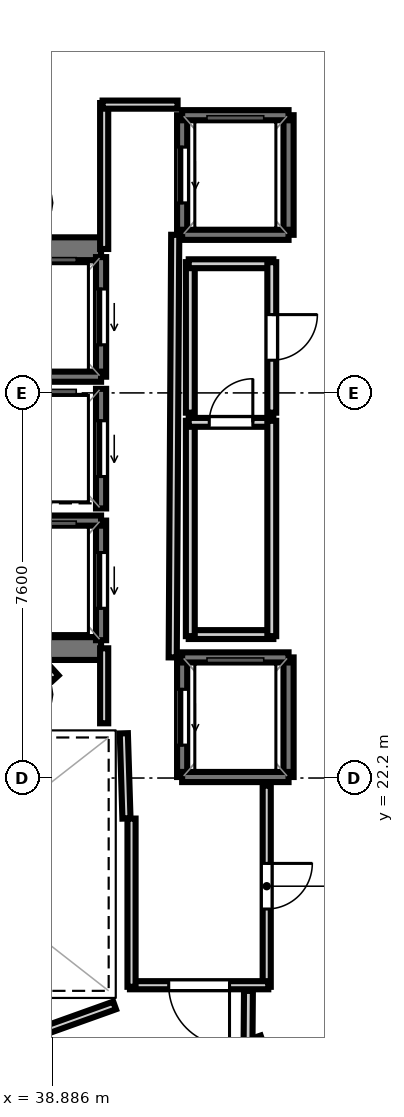
"""IFC4 building model, lengths in metres.
Left out: names, types, materials, properties, quantities, classifications, styles, units other than length and angle.
Written with IfcOpenShell. Run it as: python <this file> out.ifc"""

import sys

from ifc_helpers import new_model, si_unit, direction, frame, frame_2d, origin, place, context, subcontext, project, spatial, rectangle, extrude, element, fill, save


model = new_model("IFC4")
c1 = context("Model", 3, precision=1e-05, world=origin(), true_north=direction((0.0, 1.0)))
c2 = subcontext(c1, "Body", "Model", "MODEL_VIEW")
j1 = project(units=[si_unit("LENGTHUNIT", "METRE"), si_unit("PLANEANGLEUNIT", "RADIAN")], contexts=[c1])
p1 = place(None, origin())
s1 = spatial("IfcSite", under=j1, at=p1, CompositionType="ELEMENT")
p2 = place(p1, origin())
s2 = spatial("IfcBuilding", under=s1, at=p2, CompositionType="ELEMENT")
p3 = place(p2, frame((0.0, 0.0, 280.6)))
s3 = spatial("IfcBuildingStorey", under=s2, at=p3, CompositionType="ELEMENT", Elevation=280.6)
p4 = place(p3, frame((29.33, 32.645, 0.0), z_axis=(0.0, 0.0, 1.0), x_axis=(1.0, 0.0, 0.0)))
e1 = element("IfcWall", 1, at=p4, inside=s3, PredefinedType="SHEAR", context=c2, shape_type="SweptSolid", body=[
    extrude(rectangle(XDim=10.52, YDim=0.45, at=frame_2d((5.26, 0.0))), origin(), (0.0, 0.0, 1.0), 3.52),
])
p5 = place(p4, frame((0.895, 0.0, 0.0)))
e2 = element("IfcOpeningElement", 2, at=p5, cuts=e1, PredefinedType="OPENING", context=c2, shape_type="SweptSolid", body=[
    extrude(rectangle(XDim=1.25, YDim=2.15, at=frame_2d((0.625, 1.075))), frame((0.0, 0.235, 0.0), z_axis=(0.0, -1.0, 0.0), x_axis=(1.0, 0.0, 0.0)), (0.0, 0.0, 1.0), 0.47),
])
p6 = place(p3, frame((29.33, 24.755, 0.0), z_axis=(0.0, 0.0, 1.0), x_axis=(1.0, 0.0, 0.0)))
e3 = element("IfcWall", 3, at=p6, inside=s3, PredefinedType="SHEAR", context=c2, shape_type="SweptSolid", body=[
    extrude(rectangle(XDim=10.52, YDim=0.45, at=frame_2d((5.26, 0.0))), origin(), (0.0, 0.0, 1.0), 3.52),
])
p7 = place(p6, frame((0.695, 0.0, 0.0)))
e4 = element("IfcOpeningElement", 4, at=p7, cuts=e3, PredefinedType="OPENING", context=c2, shape_type="SweptSolid", body=[
    extrude(rectangle(XDim=1.25, YDim=2.15, at=frame_2d((0.625, 1.075))), frame((0.0, 0.235, 0.0), z_axis=(0.0, -1.0, 0.0), x_axis=(1.0, 0.0, 0.0)), (0.0, 0.0, 1.0), 0.47),
])
p8 = place(p3, frame((39.85, 30.12, 0.0), z_axis=(0.0, 0.0, 1.0), x_axis=(0.0, 1.0, 0.0)))
e5 = element("IfcWall", 5, at=p8, inside=s3, PredefinedType="SOLIDWALL", context=c2, shape_type="SweptSolid", body=[
    extrude(rectangle(XDim=2.36, YDim=0.2, at=frame_2d((1.18, 0.0))), origin(), (0.0, 0.0, 1.0), 3.52),
])
p9 = place(p8, frame((0.63, 0.0, 0.0)))
e6 = element("IfcOpeningElement", 6, at=p9, cuts=e5, PredefinedType="OPENING", context=c2, shape_type="SweptSolid", body=[
    extrude(rectangle(XDim=1.1, YDim=2.15, at=frame_2d((0.55, 1.075))), frame((0.0, 0.11, 0.0), z_axis=(0.0, -1.0, 0.0), x_axis=(1.0, 0.0, 0.0)), (0.0, 0.0, 1.0), 0.22),
])
p10 = place(p3, frame((37.75, 30.12, 0.0), z_axis=(0.0, 0.0, 1.0), x_axis=(1.0, 0.0, 0.0)))
e7 = element("IfcWall", 7, at=p10, inside=s3, PredefinedType="SOLIDWALL", context=c2, shape_type="SweptSolid", body=[
    extrude(rectangle(XDim=2.1, YDim=0.2, at=frame_2d((1.05, 0.0))), origin(), (0.0, 0.0, 1.0), 3.52),
])
p11 = place(p3, frame((39.85, 24.92, 0.0), z_axis=(0.0, 0.0, 1.0), x_axis=(0.0, 1.0, 0.0)))
e8 = element("IfcWall", 8, at=p11, inside=s3, PredefinedType="SOLIDWALL", context=c2, shape_type="SweptSolid", body=[
    extrude(rectangle(XDim=2.36, YDim=0.2, at=frame_2d((1.18, 0.0))), origin(), (0.0, 0.0, 1.0), 3.52),
])
p12 = place(p11, frame((0.63, 0.0, 0.0)))
e9 = element("IfcOpeningElement", 9, at=p12, cuts=e8, PredefinedType="OPENING", context=c2, shape_type="SweptSolid", body=[
    extrude(rectangle(XDim=1.1, YDim=2.15, at=frame_2d((0.55, 1.075))), frame((0.0, 0.11, 0.0), z_axis=(0.0, -1.0, 0.0), x_axis=(1.0, 0.0, 0.0)), (0.0, 0.0, 1.0), 0.22),
])
p13 = place(p3, frame((37.75, 27.28, 0.0), z_axis=(0.0, 0.0, 1.0), x_axis=(1.0, 0.0, 0.0)))
e10 = element("IfcWall", 10, at=p13, inside=s3, PredefinedType="SOLIDWALL", context=c2, shape_type="SweptSolid", body=[
    extrude(rectangle(XDim=2.1, YDim=0.2, at=frame_2d((1.05, 0.0))), origin(), (0.0, 0.0, 1.0), 3.52),
])
p14 = place(p3, frame((39.85, 27.52, 0.0), z_axis=(0.0, 0.0, 1.0), x_axis=(0.0, 1.0, 0.0)))
e11 = element("IfcWall", 11, at=p14, inside=s3, PredefinedType="SOLIDWALL", context=c2, shape_type="SweptSolid", body=[
    extrude(rectangle(XDim=2.36, YDim=0.2, at=frame_2d((1.18, 0.0))), origin(), (0.0, 0.0, 1.0), 3.52),
])
p15 = place(p14, frame((0.63, 0.0, 0.0)))
e12 = element("IfcOpeningElement", 12, at=p15, cuts=e11, PredefinedType="OPENING", context=c2, shape_type="SweptSolid", body=[
    extrude(rectangle(XDim=1.1, YDim=2.15, at=frame_2d((0.55, 1.075))), frame((0.0, 0.11, 0.0), z_axis=(0.0, -1.0, 0.0), x_axis=(1.0, 0.0, 0.0)), (0.0, 0.0, 1.0), 0.22),
])
p16 = place(p3, frame((43.55, 22.22, 0.0), z_axis=(0.0, 0.0, 1.0), x_axis=(0.0, 1.0, 0.0)))
e13 = element("IfcWall", 13, at=p16, inside=s3, PredefinedType="SOLIDWALL", context=c2, shape_type="SweptSolid", body=[
    extrude(rectangle(XDim=2.36, YDim=0.2, at=frame_2d((1.18, 0.0))), origin(), (0.0, 0.0, 1.0), 3.52),
])
p17 = place(p3, frame((41.45, 22.22, 0.0), z_axis=(0.0, 0.0, 1.0), x_axis=(0.0, 1.0, 0.0)))
e14 = element("IfcWall", 14, at=p17, inside=s3, PredefinedType="SOLIDWALL", context=c2, shape_type="SweptSolid", body=[
    extrude(rectangle(XDim=2.36, YDim=0.2, at=frame_2d((1.18, 0.0))), origin(), (0.0, 0.0, 1.0), 3.52),
])
p18 = place(p17, frame((0.63, 0.0, 0.0)))
e15 = element("IfcOpeningElement", 15, at=p18, cuts=e14, PredefinedType="OPENING", context=c2, shape_type="SweptSolid", body=[
    extrude(rectangle(XDim=1.1, YDim=2.15, at=frame_2d((0.55, 1.075))), frame((0.0, 0.11, 0.0), z_axis=(0.0, -1.0, 0.0), x_axis=(1.0, 0.0, 0.0)), (0.0, 0.0, 1.0), 0.22),
])
for number, where, z_axis, x_axis in (
    (16, (41.45, 24.58, 0.0), (0.0, 0.0, 1.0), (1.0, 0.0, 0.0)),
    (17, (41.45, 22.22, 0.0), (0.0, 0.0, 1.0), (1.0, 0.0, 0.0)),
):
    element("IfcWall", number, at=place(p3, frame(where, z_axis=z_axis, x_axis=x_axis)), inside=s3, PredefinedType="SOLIDWALL", context=c2, shape_type="SweptSolid", body=[
        extrude(rectangle(XDim=2.1, YDim=0.2, at=frame_2d((1.05, 0.0))), origin(), (0.0, 0.0, 1.0), 3.52),
    ])
p19 = place(p3, frame((43.55, 32.92, 0.0), z_axis=(0.0, 0.0, 1.0), x_axis=(0.0, 1.0, 0.0)))
e18 = element("IfcWall", 18, at=p19, inside=s3, PredefinedType="SOLIDWALL", context=c2, shape_type="SweptSolid", body=[
    extrude(rectangle(XDim=2.36, YDim=0.2, at=frame_2d((1.18, 0.0))), origin(), (0.0, 0.0, 1.0), 3.52),
])
p20 = place(p3, frame((41.45, 32.92, 0.0), z_axis=(0.0, 0.0, 1.0), x_axis=(0.0, 1.0, 0.0)))
e19 = element("IfcWall", 19, at=p20, inside=s3, PredefinedType="SOLIDWALL", context=c2, shape_type="SweptSolid", body=[
    extrude(rectangle(XDim=2.36, YDim=0.2, at=frame_2d((1.18, 0.0))), origin(), (0.0, 0.0, 1.0), 3.52),
])
p21 = place(p20, frame((0.63, 0.0, 0.0)))
e20 = element("IfcOpeningElement", 20, at=p21, cuts=e19, PredefinedType="OPENING", context=c2, shape_type="SweptSolid", body=[
    extrude(rectangle(XDim=1.1, YDim=2.15, at=frame_2d((0.55, 1.075))), frame((0.0, 0.11, 0.0), z_axis=(0.0, -1.0, 0.0), x_axis=(1.0, 0.0, 0.0)), (0.0, 0.0, 1.0), 0.22),
])
for number, where, z_axis, x_axis in (
    (21, (41.45, 35.28, 0.0), (0.0, 0.0, 1.0), (1.0, 0.0, 0.0)),
    (22, (41.45, 32.92, 0.0), (0.0, 0.0, 1.0), (1.0, 0.0, 0.0)),
):
    element("IfcWall", number, at=place(p3, frame(where, z_axis=z_axis, x_axis=x_axis)), inside=s3, PredefinedType="SOLIDWALL", context=c2, shape_type="SweptSolid", body=[
        extrude(rectangle(XDim=2.1, YDim=0.2, at=frame_2d((1.05, 0.0))), origin(), (0.0, 0.0, 1.0), 3.52),
    ])
p22 = place(p3, frame((40.351, 21.401, 0.0), z_axis=(0.0, 0.0, 1.0), x_axis=(-0.031058045979, 0.999517582527, 0.0)))
e23 = element("IfcWall", 23, at=p22, inside=s3, PredefinedType="PARTITIONING", context=c2, shape_type="SweptSolid", body=[
    extrude(rectangle(XDim=1.682, YDim=0.16, at=frame_2d((0.841, 0.0))), origin(), (0.0, 0.0, 1.0), 2.84),
])
p23 = place(p3, frame((39.911, 23.28, 0.0), z_axis=(0.0, 0.0, 1.0), x_axis=(0.0, 1.0, 0.0)))
e24 = element("IfcWall", 24, at=p23, inside=s3, PredefinedType="PARTITIONING", context=c2, shape_type="SweptSolid", body=[
    extrude(rectangle(XDim=1.48, YDim=0.16, at=frame_2d((0.74, 0.0))), origin(), (0.0, 0.0, 1.0), 2.84),
])
p24 = place(p3, frame((39.911, 32.64, 0.0), z_axis=(0.0, 0.0, 1.0), x_axis=(0.0, 1.0, 0.0)))
e25 = element("IfcWall", 25, at=p24, inside=s3, PredefinedType="PARTITIONING", context=c2, shape_type="SweptSolid", body=[
    extrude(rectangle(XDim=2.88, YDim=0.16, at=frame_2d((1.44, 0.0))), origin(), (0.0, 0.0, 1.0), 2.84),
])
p25 = place(p3, frame((39.88, 35.489, 0.0), z_axis=(0.0, 0.0, 1.0), x_axis=(1.0, 0.0, 0.0)))
e26 = element("IfcWall", 26, at=p25, inside=s3, PredefinedType="PARTITIONING", context=c2, shape_type="SweptSolid", body=[
    extrude(rectangle(XDim=1.48, YDim=0.16, at=frame_2d((0.74, 0.0))), origin(), (0.0, 0.0, 1.0), 2.84),
])
p26 = place(p3, frame((41.313, 32.92, 0.0), z_axis=(0.0, 0.0, 1.0), x_axis=(-0.005942518022, -0.999982343084, 0.0)))
e27 = element("IfcWall", 27, at=p26, inside=s3, PredefinedType="PARTITIONING", context=c2, shape_type="SweptSolid", body=[
    extrude(rectangle(XDim=8.34, YDim=0.16, at=frame_2d((4.17, 0.0))), origin(), (0.0, 0.0, 1.0), 2.84),
])
p27 = place(p3, frame((43.119, 22.05, 0.0), z_axis=(0.0, 0.0, 1.0), x_axis=(0.0, -1.0, 0.0)))
e28 = element("IfcWall", 28, at=p27, inside=s3, PredefinedType="PARTITIONING", context=c2, shape_type="SweptSolid", body=[
    extrude(rectangle(XDim=3.97, YDim=0.16, at=frame_2d((1.985, 0.0))), origin(), (0.0, 0.0, 1.0), 2.84),
])
p28 = place(p27, frame((1.535, 0.0, 0.0)))
e29 = element("IfcOpeningElement", 29, at=p28, cuts=e28, PredefinedType="OPENING", context=c2, shape_type="SweptSolid", body=[
    extrude(rectangle(XDim=0.9, YDim=2.1, at=frame_2d((0.45, 1.05))), frame((0.0, 0.09, 0.0), z_axis=(0.0, -1.0, 0.0), x_axis=(1.0, 0.0, 0.0)), (0.0, 0.0, 1.0), 0.18),
])
p29 = place(p3, frame((43.15, 18.111, 0.0), z_axis=(0.0, 0.0, 1.0), x_axis=(-1.0, 0.0, 0.0)))
e30 = element("IfcWall", 30, at=p29, inside=s3, PredefinedType="PARTITIONING", context=c2, shape_type="SweptSolid", body=[
    extrude(rectangle(XDim=2.73, YDim=0.16, at=frame_2d((1.365, 0.0))), origin(), (0.0, 0.0, 1.0), 2.84),
])
p30 = place(p29, frame((0.765, 0.0, 0.0)))
e31 = element("IfcOpeningElement", 31, at=p30, cuts=e30, PredefinedType="OPENING", context=c2, shape_type="SweptSolid", body=[
    extrude(rectangle(XDim=1.2, YDim=2.15, at=frame_2d((0.6, 1.075))), frame((0.0, 0.09, 0.0), z_axis=(0.0, -1.0, 0.0), x_axis=(1.0, 0.0, 0.0)), (0.0, 0.0, 1.0), 0.18),
])
p31 = place(p3, frame((40.451, 18.08, 0.0), z_axis=(0.0, 0.0, 1.0), x_axis=(0.0, 1.0, 0.0)))
e32 = element("IfcWall", 32, at=p31, inside=s3, PredefinedType="PARTITIONING", context=c2, shape_type="SweptSolid", body=[
    extrude(rectangle(XDim=3.32, YDim=0.16, at=frame_2d((1.66, 0.0))), origin(), (0.0, 0.0, 1.0), 2.84),
])
p32 = place(p3, frame((43.25, 25.031, 0.0), z_axis=(0.0, 0.0, 1.0), x_axis=(-1.0, 0.0, 0.0)))
e33 = element("IfcWall", 33, at=p32, inside=s3, PredefinedType="PLUMBINGWALL", context=c2, shape_type="SweptSolid", body=[
    extrude(rectangle(XDim=1.67, YDim=0.175, at=frame_2d((0.835, 0.0))), origin(), (0.0, 0.0, 1.0), 2.84),
])
p33 = place(p3, frame((41.611, 25.0, 0.0), z_axis=(0.0, 0.0, 1.0), x_axis=(0.0, 1.0, 0.0)))
e34 = element("IfcWall", 34, at=p33, inside=s3, PredefinedType="PLUMBINGWALL", context=c2, shape_type="SweptSolid", body=[
    extrude(rectangle(XDim=4.25, YDim=0.175, at=frame_2d((2.125, 0.0))), origin(), (0.0, 0.0, 1.0), 2.84),
])
p34 = place(p3, frame((41.58, 29.219, 0.0), z_axis=(0.0, 0.0, 1.0), x_axis=(1.0, 0.0, 0.0)))
e35 = element("IfcWall", 35, at=p34, inside=s3, PredefinedType="PLUMBINGWALL", context=c2, shape_type="SweptSolid", body=[
    extrude(rectangle(XDim=1.67, YDim=0.175, at=frame_2d((0.835, 0.0))), origin(), (0.0, 0.0, 1.0), 2.84),
])
p35 = place(p34, frame((0.405, 0.0, 0.0)))
e36 = element("IfcOpeningElement", 36, at=p35, cuts=e35, PredefinedType="OPENING", context=c2, shape_type="SweptSolid", body=[
    extrude(rectangle(XDim=0.86, YDim=2.05, at=frame_2d((0.43, 1.025))), frame((0.0, 0.097, 0.0), z_axis=(0.0, -1.0, 0.0), x_axis=(1.0, 0.0, 0.0)), (0.0, 0.0, 1.0), 0.195),
])
p36 = place(p3, frame((43.219, 29.25, 0.0), z_axis=(0.0, 0.0, 1.0), x_axis=(0.0, -1.0, 0.0)))
e37 = element("IfcWall", 37, at=p36, inside=s3, PredefinedType="PLUMBINGWALL", context=c2, shape_type="SweptSolid", body=[
    extrude(rectangle(XDim=4.25, YDim=0.175, at=frame_2d((2.125, 0.0))), origin(), (0.0, 0.0, 1.0), 2.84),
])
p37 = place(p3, frame((41.611, 29.41, 0.0), z_axis=(0.0, 0.0, 1.0), x_axis=(0.0, 1.0, 0.0)))
e38 = element("IfcWall", 38, at=p37, inside=s3, PredefinedType="PLUMBINGWALL", context=c2, shape_type="SweptSolid", body=[
    extrude(rectangle(XDim=2.97, YDim=0.175, at=frame_2d((1.485, 0.0))), origin(), (0.0, 0.0, 1.0), 2.84),
])
p38 = place(p3, frame((41.58, 32.349, 0.0), z_axis=(0.0, 0.0, 1.0), x_axis=(1.0, 0.0, 0.0)))
e39 = element("IfcWall", 39, at=p38, inside=s3, PredefinedType="PLUMBINGWALL", context=c2, shape_type="SweptSolid", body=[
    extrude(rectangle(XDim=1.67, YDim=0.175, at=frame_2d((0.835, 0.0))), origin(), (0.0, 0.0, 1.0), 2.84),
])
p39 = place(p3, frame((43.219, 32.38, 0.0), z_axis=(0.0, 0.0, 1.0), x_axis=(0.0, -1.0, 0.0)))
e40 = element("IfcWall", 40, at=p39, inside=s3, PredefinedType="PLUMBINGWALL", context=c2, shape_type="SweptSolid", body=[
    extrude(rectangle(XDim=2.97, YDim=0.175, at=frame_2d((1.485, 0.0))), origin(), (0.0, 0.0, 1.0), 2.84),
])
p40 = place(p39, frame((1.035, 0.0, 0.0)))
e41 = element("IfcOpeningElement", 41, at=p40, cuts=e40, PredefinedType="OPENING", context=c2, shape_type="SweptSolid", body=[
    extrude(rectangle(XDim=0.9, YDim=2.1, at=frame_2d((0.45, 1.05))), frame((0.0, 0.097, 0.0), z_axis=(0.0, -1.0, 0.0), x_axis=(1.0, 0.0, 0.0)), (0.0, 0.0, 1.0), 0.195),
])
p41 = place(p3, frame((38.951, 24.171, 0.0), z_axis=(0.0, 0.0, 1.0), x_axis=(-0.674186852077, 0.738560822469, 0.0)))
e42 = element("IfcWall", 42, at=p41, inside=s3, PredefinedType="PARTITIONING", context=c2, shape_type="SweptSolid", body=[
    extrude(rectangle(XDim=0.281, YDim=0.16, at=frame_2d((0.14, 0.0))), origin(), (0.0, 0.0, 1.0), 2.84),
])
p42 = place(p3, frame((36.81, 16.529, 0.0), z_axis=(0.0, 0.0, 1.0), x_axis=(0.941548344365, 0.33687789364, 0.0)))
e43 = element("IfcWall", 43, at=p42, inside=s3, PredefinedType="PARTITIONING", context=c2, shape_type="SweptSolid", body=[
    extrude(rectangle(XDim=3.513, YDim=0.16, at=frame_2d((1.756, 0.0))), origin(), (0.0, 0.0, 1.0), 2.84),
])
p43 = place(p3, frame((42.924, 17.092, 0.0), z_axis=(0.0, 0.0, 1.0), x_axis=(0.324748509852, -0.945800404604, 0.0)))
e44 = element("IfcWall", 44, at=p43, inside=s3, PredefinedType="PARTITIONING", context=c2, shape_type="SweptSolid", body=[
    extrude(rectangle(XDim=1.751, YDim=0.16, at=frame_2d((0.875, 0.0))), origin(), (0.0, 0.0, 1.0), 2.84),
])
p44 = place(p3, frame((42.73, 14.331, 0.0), z_axis=(0.0, 0.0, 1.0), x_axis=(0.007785749238, 0.999969690595, 0.0)))
e45 = element("IfcWall", 45, at=p44, inside=s3, PredefinedType="PLUMBINGWALL", context=c2, shape_type="SweptSolid", body=[
    extrude(rectangle(XDim=3.669, YDim=0.175, at=frame_2d((1.834, 0.0))), origin(), (0.0, 0.0, 1.0), 2.84),
])
p45 = place(p9, origin())
e46 = element("IfcDoor", 46, at=p45, inside=s3, OperationType="SLIDING_TO_LEFT", PredefinedType="DOOR", context=c2, shape_type="SweptSolid", body=[
    extrude(rectangle(XDim=1.1, YDim=2.15, at=frame_2d((0.55, 1.075))), frame((0.0, 0.025, 0.0), z_axis=(0.0, -1.0, 0.0), x_axis=(1.0, 0.0, 0.0)), (0.0, 0.0, 1.0), 0.05),
])
fill(e6, e46)
p46 = place(p12, origin())
e47 = element("IfcDoor", 47, at=p46, inside=s3, OperationType="SLIDING_TO_LEFT", PredefinedType="DOOR", context=c2, shape_type="SweptSolid", body=[
    extrude(rectangle(XDim=1.1, YDim=2.15, at=frame_2d((0.55, 1.075))), frame((0.0, 0.025, 0.0), z_axis=(0.0, -1.0, 0.0), x_axis=(1.0, 0.0, 0.0)), (0.0, 0.0, 1.0), 0.05),
])
fill(e9, e47)
p47 = place(p15, origin())
e48 = element("IfcDoor", 48, at=p47, inside=s3, OperationType="SLIDING_TO_LEFT", PredefinedType="DOOR", context=c2, shape_type="SweptSolid", body=[
    extrude(rectangle(XDim=1.1, YDim=2.15, at=frame_2d((0.55, 1.075))), frame((0.0, 0.025, 0.0), z_axis=(0.0, -1.0, 0.0), x_axis=(1.0, 0.0, 0.0)), (0.0, 0.0, 1.0), 0.05),
])
fill(e12, e48)
p48 = place(p18, origin())
e49 = element("IfcDoor", 49, at=p48, inside=s3, OperationType="SLIDING_TO_LEFT", PredefinedType="DOOR", context=c2, shape_type="SweptSolid", body=[
    extrude(rectangle(XDim=1.1, YDim=2.15, at=frame_2d((0.55, 1.075))), frame((0.0, 0.025, 0.0), z_axis=(0.0, -1.0, 0.0), x_axis=(1.0, 0.0, 0.0)), (0.0, 0.0, 1.0), 0.05),
])
fill(e15, e49)
p49 = place(p21, origin())
e50 = element("IfcDoor", 50, at=p49, inside=s3, OperationType="SLIDING_TO_LEFT", PredefinedType="DOOR", context=c2, shape_type="SweptSolid", body=[
    extrude(rectangle(XDim=1.1, YDim=2.15, at=frame_2d((0.55, 1.075))), frame((0.0, 0.025, 0.0), z_axis=(0.0, -1.0, 0.0), x_axis=(1.0, 0.0, 0.0)), (0.0, 0.0, 1.0), 0.05),
])
fill(e20, e50)
p50 = place(p30, origin())
e51 = element("IfcDoor", 51, at=p50, inside=s3, OperationType="SINGLE_SWING_LEFT", PredefinedType="DOOR", context=c2, shape_type="SweptSolid", body=[
    extrude(rectangle(XDim=1.2, YDim=2.15, at=frame_2d((0.6, 1.075))), frame((0.0, 0.025, 0.0), z_axis=(0.0, -1.0, 0.0), x_axis=(1.0, 0.0, 0.0)), (0.0, 0.0, 1.0), 0.05),
])
fill(e31, e51)
p51 = place(p28, origin())
e52 = element("IfcDoor", 52, at=p51, inside=s3, OperationType="SINGLE_SWING_LEFT", PredefinedType="DOOR", context=c2, shape_type="SweptSolid", body=[
    extrude(rectangle(XDim=0.9, YDim=2.1, at=frame_2d((0.45, 1.05))), frame((0.0, 0.025, 0.0), z_axis=(0.0, -1.0, 0.0), x_axis=(1.0, 0.0, 0.0)), (0.0, 0.0, 1.0), 0.05),
])
fill(e29, e52)
p52 = place(p40, origin())
e53 = element("IfcDoor", 53, at=p52, inside=s3, OperationType="SINGLE_SWING_LEFT", PredefinedType="DOOR", context=c2, shape_type="SweptSolid", body=[
    extrude(rectangle(XDim=0.9, YDim=2.1, at=frame_2d((0.45, 1.05))), frame((0.0, 0.025, 0.0), z_axis=(0.0, -1.0, 0.0), x_axis=(1.0, 0.0, 0.0)), (0.0, 0.0, 1.0), 0.05),
])
fill(e41, e53)
p53 = place(p35, origin())
e54 = element("IfcDoor", 54, at=p53, inside=s3, OperationType="SINGLE_SWING_RIGHT", PredefinedType="DOOR", context=c2, shape_type="SweptSolid", body=[
    extrude(rectangle(XDim=0.86, YDim=2.05, at=frame_2d((0.43, 1.025))), frame((0.0, 0.025, 0.0), z_axis=(0.0, -1.0, 0.0), x_axis=(1.0, 0.0, 0.0)), (0.0, 0.0, 1.0), 0.05),
])
fill(e36, e54)
save(model, sys.argv[1])
